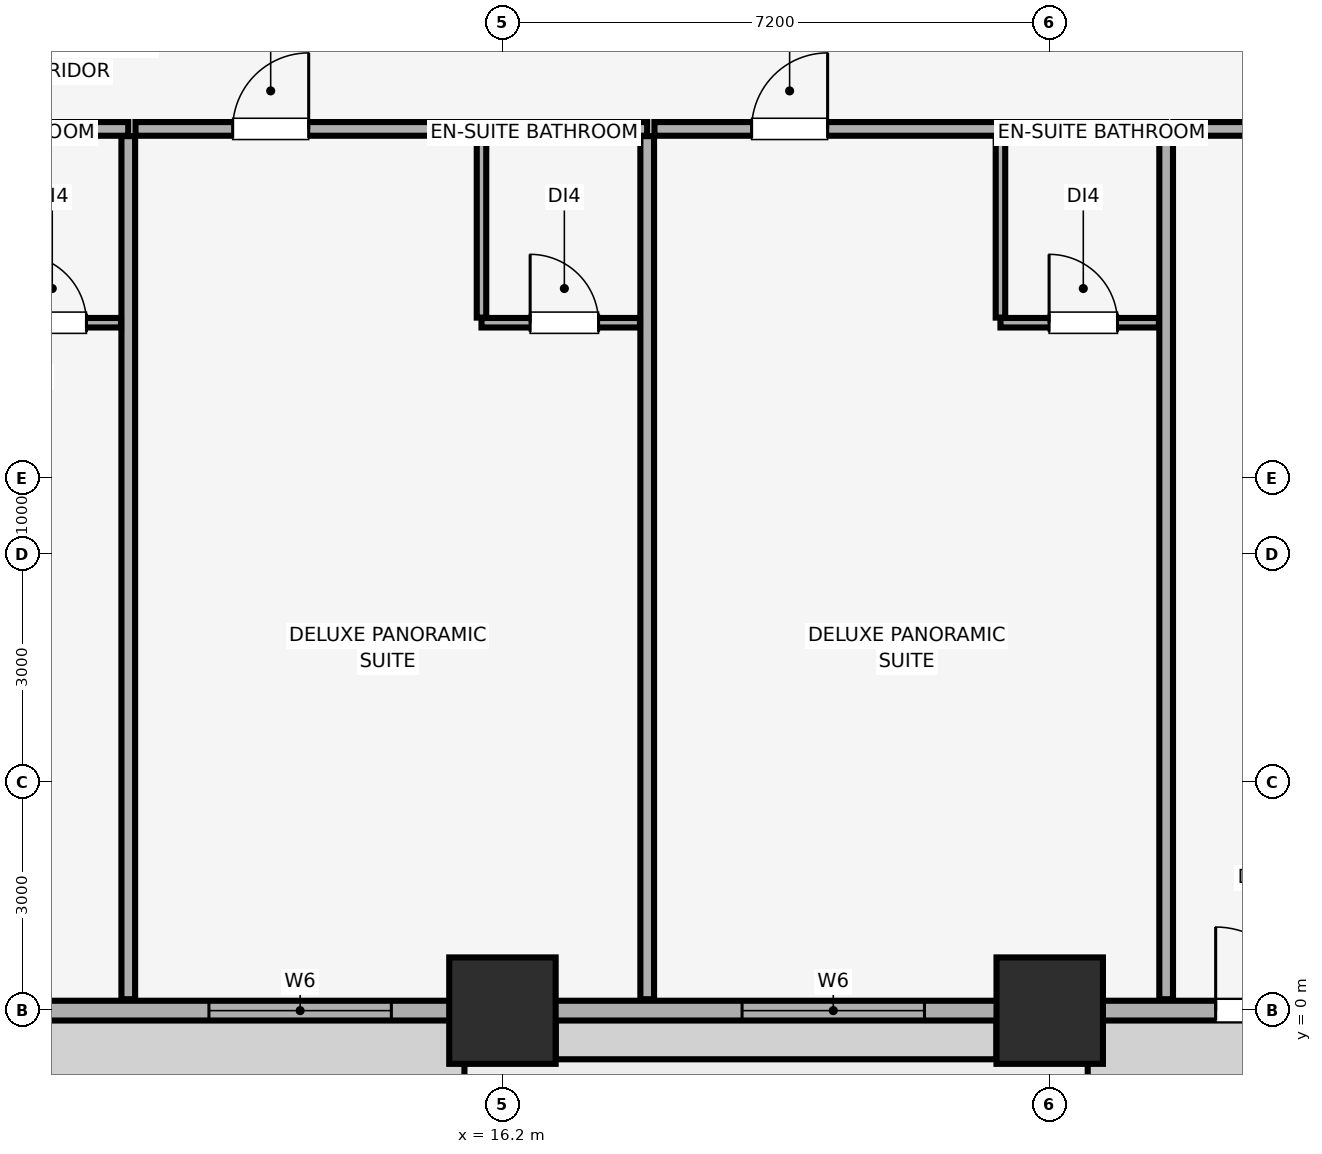
"""IFC4 building model, lengths in metres.
Left out: names, types, materials, properties, quantities, classifications, styles, units other than length and angle.
Written with IfcOpenShell. Run it as: python <this file> out.ifc"""

import sys

from ifc_helpers import new_model, si_unit, direction, frame, frame_2d, origin, origin_2d, place, context, subcontext, project, spatial, rectangle, extrude, element, fill, save


model = new_model("IFC4")
c1 = context("Model", 3, precision=1e-05, world=origin(), true_north=direction((0.0, 1.0)))
c2 = subcontext(c1, "Body", "Model", "MODEL_VIEW")
j1 = project(units=[si_unit("LENGTHUNIT", "METRE"), si_unit("PLANEANGLEUNIT", "RADIAN")], contexts=[c1])
p1 = place(None, origin())
s1 = spatial("IfcSite", under=j1, at=p1, CompositionType="ELEMENT")
p2 = place(p1, origin())
s2 = spatial("IfcBuilding", under=s1, at=p2, CompositionType="ELEMENT")
p3 = place(p2, frame((0.0, 0.0, 57.65)))
s3 = spatial("IfcBuildingStorey", under=s2, at=p3, CompositionType="ELEMENT", Elevation=57.65)
for number, where, z_axis, x_axis in (
    (1, (16.2, 0.0, 0.0), (0.0, 0.0, 1.0), (1.0, 0.0, 0.0)),
    (2, (23.4, 0.0, 0.0), (0.0, 0.0, 1.0), (1.0, 0.0, 0.0)),
):
    element("IfcColumn", number, at=place(p3, frame(where, z_axis=z_axis, x_axis=x_axis)), inside=s3, PredefinedType="COLUMN", context=c2, shape_type="SweptSolid", body=[
        extrude(rectangle(XDim=1.4, YDim=1.4, at=origin_2d()), origin(), (0.0, 0.0, 1.0), 3.51),
    ])
p4 = place(p3, frame((4.2, 0.0, 0.0), z_axis=(0.0, 0.0, 1.0), x_axis=(1.0, 0.0, 0.0)))
e3 = element("IfcWall", 3, at=p4, inside=s3, PredefinedType="SOLIDWALL", context=c2, shape_type="SweptSolid", body=[
    extrude(rectangle(XDim=75.6, YDim=0.26, at=frame_2d((37.8, 0.0))), origin(), (0.0, 0.0, 1.0), 2.56),
])
p5 = place(p4, frame((21.383, 0.0, 0.0)))
e4 = element("IfcOpeningElement", 4, at=p5, cuts=e3, PredefinedType="OPENING", context=c2, shape_type="SweptSolid", body=[
    extrude(rectangle(XDim=1.1, YDim=2.15, at=frame_2d((0.55, 1.075))), frame((0.0, 0.14, 0.0), z_axis=(0.0, -1.0, 0.0), x_axis=(1.0, 0.0, 0.0)), (0.0, 0.0, 1.0), 0.28),
])
p6 = place(p4, frame((37.25, 0.0, 0.0)))
e5 = element("IfcOpeningElement", 5, at=p6, cuts=e3, PredefinedType="OPENING", context=c2, shape_type="SweptSolid", body=[
    extrude(rectangle(XDim=1.1, YDim=2.15, at=frame_2d((0.55, 1.075))), frame((0.0, 0.14, 0.0), z_axis=(0.0, -1.0, 0.0), x_axis=(1.0, 0.0, 0.0)), (0.0, 0.0, 1.0), 0.28),
])
p7 = place(p4, frame((53.117, 0.0, 0.0)))
e6 = element("IfcOpeningElement", 6, at=p7, cuts=e3, PredefinedType="OPENING", context=c2, shape_type="SweptSolid", body=[
    extrude(rectangle(XDim=1.1, YDim=2.15, at=frame_2d((0.55, 1.075))), frame((0.0, 0.14, 0.0), z_axis=(0.0, -1.0, 0.0), x_axis=(1.0, 0.0, 0.0)), (0.0, 0.0, 1.0), 0.28),
])
p8 = place(p4, frame((1.035, 0.0, 0.85)))
e7 = element("IfcOpeningElement", 7, at=p8, cuts=e3, PredefinedType="OPENING", context=c2, shape_type="SweptSolid", body=[
    extrude(rectangle(XDim=2.4, YDim=1.5, at=frame_2d((1.2, 0.75))), frame((0.0, 0.14, 0.0), z_axis=(0.0, -1.0, 0.0), x_axis=(1.0, 0.0, 0.0)), (0.0, 0.0, 1.0), 0.28),
])
p9 = place(p4, frame((8.138, 0.0, 0.85)))
e8 = element("IfcOpeningElement", 8, at=p9, cuts=e3, PredefinedType="OPENING", context=c2, shape_type="SweptSolid", body=[
    extrude(rectangle(XDim=2.4, YDim=1.5, at=frame_2d((1.2, 0.75))), frame((0.0, 0.14, 0.0), z_axis=(0.0, -1.0, 0.0), x_axis=(1.0, 0.0, 0.0)), (0.0, 0.0, 1.0), 0.28),
])
p10 = place(p4, frame((15.153, 0.0, 0.85)))
e9 = element("IfcOpeningElement", 9, at=p10, cuts=e3, PredefinedType="OPENING", context=c2, shape_type="SweptSolid", body=[
    extrude(rectangle(XDim=2.4, YDim=1.5, at=frame_2d((1.2, 0.75))), frame((0.0, 0.14, 0.0), z_axis=(0.0, -1.0, 0.0), x_axis=(1.0, 0.0, 0.0)), (0.0, 0.0, 1.0), 0.28),
])
p11 = place(p4, frame((23.127, 0.0, 0.85)))
e10 = element("IfcOpeningElement", 10, at=p11, cuts=e3, PredefinedType="OPENING", context=c2, shape_type="SweptSolid", body=[
    extrude(rectangle(XDim=2.4, YDim=1.5, at=frame_2d((1.2, 0.75))), frame((0.0, 0.14, 0.0), z_axis=(0.0, -1.0, 0.0), x_axis=(1.0, 0.0, 0.0)), (0.0, 0.0, 1.0), 0.28),
])
p12 = place(p4, frame((29.179, 0.0, 0.85)))
e11 = element("IfcOpeningElement", 11, at=p12, cuts=e3, PredefinedType="OPENING", context=c2, shape_type="SweptSolid", body=[
    extrude(rectangle(XDim=2.4, YDim=1.5, at=frame_2d((1.2, 0.75))), frame((0.0, 0.14, 0.0), z_axis=(0.0, -1.0, 0.0), x_axis=(1.0, 0.0, 0.0)), (0.0, 0.0, 1.0), 0.28),
])
p13 = place(p4, frame((34.983, 0.0, 0.85)))
e12 = element("IfcOpeningElement", 12, at=p13, cuts=e3, PredefinedType="OPENING", context=c2, shape_type="SweptSolid", body=[
    extrude(rectangle(XDim=1.5, YDim=1.4, at=frame_2d((0.75, 0.7))), frame((0.0, 0.14, 0.0), z_axis=(0.0, -1.0, 0.0), x_axis=(1.0, 0.0, 0.0)), (0.0, 0.0, 1.0), 0.28),
])
p14 = place(p4, frame((39.117, 0.0, 0.85)))
e13 = element("IfcOpeningElement", 13, at=p14, cuts=e3, PredefinedType="OPENING", context=c2, shape_type="SweptSolid", body=[
    extrude(rectangle(XDim=1.5, YDim=1.4, at=frame_2d((0.75, 0.7))), frame((0.0, 0.14, 0.0), z_axis=(0.0, -1.0, 0.0), x_axis=(1.0, 0.0, 0.0)), (0.0, 0.0, 1.0), 0.28),
])
p15 = place(p4, frame((44.021, 0.0, 0.85)))
e14 = element("IfcOpeningElement", 14, at=p15, cuts=e3, PredefinedType="OPENING", context=c2, shape_type="SweptSolid", body=[
    extrude(rectangle(XDim=2.4, YDim=1.5, at=frame_2d((1.2, 0.75))), frame((0.0, 0.14, 0.0), z_axis=(0.0, -1.0, 0.0), x_axis=(1.0, 0.0, 0.0)), (0.0, 0.0, 1.0), 0.28),
])
p16 = place(p4, frame((50.073, 0.0, 0.85)))
e15 = element("IfcOpeningElement", 15, at=p16, cuts=e3, PredefinedType="OPENING", context=c2, shape_type="SweptSolid", body=[
    extrude(rectangle(XDim=2.4, YDim=1.5, at=frame_2d((1.2, 0.75))), frame((0.0, 0.14, 0.0), z_axis=(0.0, -1.0, 0.0), x_axis=(1.0, 0.0, 0.0)), (0.0, 0.0, 1.0), 0.28),
])
p17 = place(p4, frame((58.048, 0.0, 0.85)))
e16 = element("IfcOpeningElement", 16, at=p17, cuts=e3, PredefinedType="OPENING", context=c2, shape_type="SweptSolid", body=[
    extrude(rectangle(XDim=2.4, YDim=1.5, at=frame_2d((1.2, 0.75))), frame((0.0, 0.14, 0.0), z_axis=(0.0, -1.0, 0.0), x_axis=(1.0, 0.0, 0.0)), (0.0, 0.0, 1.0), 0.28),
])
p18 = place(p4, frame((65.062, 0.0, 0.85)))
e17 = element("IfcOpeningElement", 17, at=p18, cuts=e3, PredefinedType="OPENING", context=c2, shape_type="SweptSolid", body=[
    extrude(rectangle(XDim=2.4, YDim=1.5, at=frame_2d((1.2, 0.75))), frame((0.0, 0.14, 0.0), z_axis=(0.0, -1.0, 0.0), x_axis=(1.0, 0.0, 0.0)), (0.0, 0.0, 1.0), 0.28),
])
p19 = place(p4, frame((72.165, 0.0, 0.85)))
e18 = element("IfcOpeningElement", 18, at=p19, cuts=e3, PredefinedType="OPENING", context=c2, shape_type="SweptSolid", body=[
    extrude(rectangle(XDim=2.4, YDim=1.5, at=frame_2d((1.2, 0.75))), frame((0.0, 0.14, 0.0), z_axis=(0.0, -1.0, 0.0), x_axis=(1.0, 0.0, 0.0)), (0.0, 0.0, 1.0), 0.28),
])
p20 = place(p3, frame((0.15, 11.6, 0.0), z_axis=(0.0, 0.0, 1.0), x_axis=(1.0, 0.0, 0.0)))
e19 = element("IfcWall", 19, at=p20, inside=s3, PredefinedType="PARTITIONING", context=c2, shape_type="SweptSolid", body=[
    extrude(rectangle(XDim=11.127, YDim=0.18, at=frame_2d((5.564, 0.0))), origin(), (0.0, 0.0, 1.0), 3.51),
])
p21 = place(p20, frame((5.514, 0.0, 0.0)))
e20 = element("IfcOpeningElement", 20, at=p21, cuts=e19, PredefinedType="OPENING", context=c2, shape_type="SweptSolid", body=[
    extrude(rectangle(XDim=1.0, YDim=2.15, at=frame_2d((0.5, 1.075))), frame((0.0, 0.1, 0.0), z_axis=(0.0, -1.0, 0.0), x_axis=(1.0, 0.0, 0.0)), (0.0, 0.0, 1.0), 0.2),
])
p22 = place(p3, frame((11.277, 0.15, 0.0), z_axis=(0.0, 0.0, 1.0), x_axis=(0.0, 1.0, 0.0)))
e21 = element("IfcWall", 21, at=p22, inside=s3, PredefinedType="PARTITIONING", context=c2, shape_type="SweptSolid", body=[
    extrude(rectangle(XDim=11.355, YDim=0.18, at=frame_2d((5.677, 0.0))), origin(), (0.0, 0.0, 1.0), 3.51),
])
p23 = place(p3, frame((8.777, 9.05, 0.0), z_axis=(0.0, 0.0, 1.0), x_axis=(1.0, 0.0, 0.0)))
e22 = element("IfcWall", 22, at=p23, inside=s3, PredefinedType="PARTITIONING", context=c2, shape_type="SweptSolid", body=[
    extrude(rectangle(XDim=2.405, YDim=0.125, at=frame_2d((1.203, 0.0))), origin(), (0.0, 0.0, 1.0), 3.51),
])
p24 = place(p23, frame((1.05, 0.0, 0.0)))
e23 = element("IfcOpeningElement", 23, at=p24, cuts=e22, PredefinedType="OPENING", context=c2, shape_type="SweptSolid", body=[
    extrude(rectangle(XDim=0.9, YDim=2.1, at=frame_2d((0.45, 1.05))), frame((0.0, 0.073, 0.0), z_axis=(0.0, -1.0, 0.0), x_axis=(1.0, 0.0, 0.0)), (0.0, 0.0, 1.0), 0.145),
])
p25 = place(p3, frame((11.372, 11.6, 0.0), z_axis=(0.0, 0.0, 1.0), x_axis=(1.0, 0.0, 0.0)))
e24 = element("IfcWall", 24, at=p25, inside=s3, PredefinedType="PARTITIONING", context=c2, shape_type="SweptSolid", body=[
    extrude(rectangle(XDim=6.732, YDim=0.18, at=frame_2d((3.366, 0.0))), origin(), (0.0, 0.0, 1.0), 3.51),
])
p26 = place(p25, frame((1.279, 0.0, 0.0)))
e25 = element("IfcOpeningElement", 25, at=p26, cuts=e24, PredefinedType="OPENING", context=c2, shape_type="SweptSolid", body=[
    extrude(rectangle(XDim=1.0, YDim=2.15, at=frame_2d((0.5, 1.075))), frame((0.0, 0.1, 0.0), z_axis=(0.0, -1.0, 0.0), x_axis=(1.0, 0.0, 0.0)), (0.0, 0.0, 1.0), 0.2),
])
p27 = place(p3, frame((18.104, 0.15, 0.0), z_axis=(0.0, 0.0, 1.0), x_axis=(0.0, 1.0, 0.0)))
e26 = element("IfcWall", 26, at=p27, inside=s3, PredefinedType="PARTITIONING", context=c2, shape_type="SweptSolid", body=[
    extrude(rectangle(XDim=11.355, YDim=0.18, at=frame_2d((5.677, 0.0))), origin(), (0.0, 0.0, 1.0), 3.51),
])
p28 = place(p3, frame((15.925, 9.05, 0.0), z_axis=(0.0, 0.0, 1.0), x_axis=(1.0, 0.0, 0.0)))
e27 = element("IfcWall", 27, at=p28, inside=s3, PredefinedType="PARTITIONING", context=c2, shape_type="SweptSolid", body=[
    extrude(rectangle(XDim=2.085, YDim=0.125, at=frame_2d((1.042, 0.0))), origin(), (0.0, 0.0, 1.0), 3.51),
])
p29 = place(p28, frame((0.64, 0.0, 0.0)))
e28 = element("IfcOpeningElement", 28, at=p29, cuts=e27, PredefinedType="OPENING", context=c2, shape_type="SweptSolid", body=[
    extrude(rectangle(XDim=0.9, YDim=2.1, at=frame_2d((0.45, 1.05))), frame((0.0, 0.073, 0.0), z_axis=(0.0, -1.0, 0.0), x_axis=(1.0, 0.0, 0.0)), (0.0, 0.0, 1.0), 0.145),
])
p30 = place(p3, frame((15.925, 9.117, 0.0), z_axis=(0.0, 0.0, 1.0), x_axis=(0.0, 1.0, 0.0)))
e29 = element("IfcWall", 29, at=p30, inside=s3, PredefinedType="PARTITIONING", context=c2, shape_type="SweptSolid", body=[
    extrude(rectangle(XDim=2.387, YDim=0.125, at=frame_2d((1.194, 0.0))), origin(), (0.0, 0.0, 1.0), 3.51),
])
p31 = place(p3, frame((18.199, 11.6, 0.0), z_axis=(0.0, 0.0, 1.0), x_axis=(1.0, 0.0, 0.0)))
e30 = element("IfcWall", 30, at=p31, inside=s3, PredefinedType="PARTITIONING", context=c2, shape_type="SweptSolid", body=[
    extrude(rectangle(XDim=6.732, YDim=0.18, at=frame_2d((3.366, 0.0))), origin(), (0.0, 0.0, 1.0), 3.51),
])
p32 = place(p31, frame((1.279, 0.0, 0.0)))
e31 = element("IfcOpeningElement", 31, at=p32, cuts=e30, PredefinedType="OPENING", context=c2, shape_type="SweptSolid", body=[
    extrude(rectangle(XDim=1.0, YDim=2.15, at=frame_2d((0.5, 1.075))), frame((0.0, 0.1, 0.0), z_axis=(0.0, -1.0, 0.0), x_axis=(1.0, 0.0, 0.0)), (0.0, 0.0, 1.0), 0.2),
])
p33 = place(p3, frame((24.932, 0.15, 0.0), z_axis=(0.0, 0.0, 1.0), x_axis=(0.0, 1.0, 0.0)))
e32 = element("IfcWall", 32, at=p33, inside=s3, PredefinedType="PARTITIONING", context=c2, shape_type="SweptSolid", body=[
    extrude(rectangle(XDim=11.355, YDim=0.18, at=frame_2d((5.677, 0.0))), origin(), (0.0, 0.0, 1.0), 3.51),
])
p34 = place(p3, frame((22.752, 9.05, 0.0), z_axis=(0.0, 0.0, 1.0), x_axis=(1.0, 0.0, 0.0)))
e33 = element("IfcWall", 33, at=p34, inside=s3, PredefinedType="PARTITIONING", context=c2, shape_type="SweptSolid", body=[
    extrude(rectangle(XDim=2.085, YDim=0.125, at=frame_2d((1.042, 0.0))), origin(), (0.0, 0.0, 1.0), 3.51),
])
p35 = place(p34, frame((0.64, 0.0, 0.0)))
e34 = element("IfcOpeningElement", 34, at=p35, cuts=e33, PredefinedType="OPENING", context=c2, shape_type="SweptSolid", body=[
    extrude(rectangle(XDim=0.9, YDim=2.1, at=frame_2d((0.45, 1.05))), frame((0.0, 0.073, 0.0), z_axis=(0.0, -1.0, 0.0), x_axis=(1.0, 0.0, 0.0)), (0.0, 0.0, 1.0), 0.145),
])
p36 = place(p3, frame((22.752, 9.117, 0.0), z_axis=(0.0, 0.0, 1.0), x_axis=(0.0, 1.0, 0.0)))
e35 = element("IfcWall", 35, at=p36, inside=s3, PredefinedType="PARTITIONING", context=c2, shape_type="SweptSolid", body=[
    extrude(rectangle(XDim=2.387, YDim=0.125, at=frame_2d((1.194, 0.0))), origin(), (0.0, 0.0, 1.0), 3.51),
])
p37 = place(p3, frame((25.027, 11.6, 0.0), z_axis=(0.0, 0.0, 1.0), x_axis=(1.0, 0.0, 0.0)))
e36 = element("IfcWall", 36, at=p37, inside=s3, PredefinedType="PARTITIONING", context=c2, shape_type="SweptSolid", body=[
    extrude(rectangle(XDim=6.732, YDim=0.18, at=frame_2d((3.366, 0.0))), origin(), (0.0, 0.0, 1.0), 3.51),
])
p38 = place(p37, frame((1.279, 0.0, 0.0)))
e37 = element("IfcOpeningElement", 37, at=p38, cuts=e36, PredefinedType="OPENING", context=c2, shape_type="SweptSolid", body=[
    extrude(rectangle(XDim=1.0, YDim=2.15, at=frame_2d((0.5, 1.075))), frame((0.0, 0.1, 0.0), z_axis=(0.0, -1.0, 0.0), x_axis=(1.0, 0.0, 0.0)), (0.0, 0.0, 1.0), 0.2),
])
p39 = place(p5, origin())
e38 = element("IfcDoor", 38, at=p39, inside=s3, OperationType="SINGLE_SWING_LEFT", PredefinedType="DOOR", context=c2, shape_type="SweptSolid", body=[
    extrude(rectangle(XDim=1.1, YDim=2.15, at=frame_2d((0.55, 1.075))), frame((0.0, 0.025, 0.0), z_axis=(0.0, -1.0, 0.0), x_axis=(1.0, 0.0, 0.0)), (0.0, 0.0, 1.0), 0.05),
])
fill(e4, e38)
p40 = place(p9, origin())
e39 = element("IfcWindow", 39, at=p40, inside=s3, PartitioningType="SINGLE_PANEL", PredefinedType="WINDOW", context=c2, shape_type="SweptSolid", body=[
    extrude(rectangle(XDim=2.4, YDim=1.5, at=frame_2d((1.2, 0.75))), frame((0.0, 0.03, 0.0), z_axis=(0.0, -1.0, 0.0), x_axis=(1.0, 0.0, 0.0)), (0.0, 0.0, 1.0), 0.06),
])
fill(e8, e39)
p41 = place(p10, origin())
e40 = element("IfcWindow", 40, at=p41, inside=s3, PartitioningType="SINGLE_PANEL", PredefinedType="WINDOW", context=c2, shape_type="SweptSolid", body=[
    extrude(rectangle(XDim=2.4, YDim=1.5, at=frame_2d((1.2, 0.75))), frame((0.0, 0.03, 0.0), z_axis=(0.0, -1.0, 0.0), x_axis=(1.0, 0.0, 0.0)), (0.0, 0.0, 1.0), 0.06),
])
fill(e9, e40)
p42 = place(p24, origin())
e41 = element("IfcDoor", 41, at=p42, inside=s3, OperationType="SINGLE_SWING_LEFT", PredefinedType="DOOR", context=c2, shape_type="SweptSolid", body=[
    extrude(rectangle(XDim=0.9, YDim=2.1, at=frame_2d((0.45, 1.05))), frame((0.0, 0.025, 0.0), z_axis=(0.0, -1.0, 0.0), x_axis=(1.0, 0.0, 0.0)), (0.0, 0.0, 1.0), 0.05),
])
fill(e23, e41)
p43 = place(p26, origin())
e42 = element("IfcDoor", 42, at=p43, inside=s3, OperationType="SINGLE_SWING_RIGHT", PredefinedType="DOOR", context=c2, shape_type="SweptSolid", body=[
    extrude(rectangle(XDim=1.0, YDim=2.15, at=frame_2d((0.5, 1.075))), frame((0.0, 0.025, 0.0), z_axis=(0.0, -1.0, 0.0), x_axis=(1.0, 0.0, 0.0)), (0.0, 0.0, 1.0), 0.05),
])
fill(e25, e42)
p44 = place(p29, origin())
e43 = element("IfcDoor", 43, at=p44, inside=s3, OperationType="SINGLE_SWING_LEFT", PredefinedType="DOOR", context=c2, shape_type="SweptSolid", body=[
    extrude(rectangle(XDim=0.9, YDim=2.1, at=frame_2d((0.45, 1.05))), frame((0.0, 0.025, 0.0), z_axis=(0.0, -1.0, 0.0), x_axis=(1.0, 0.0, 0.0)), (0.0, 0.0, 1.0), 0.05),
])
fill(e28, e43)
p45 = place(p32, origin())
e44 = element("IfcDoor", 44, at=p45, inside=s3, OperationType="SINGLE_SWING_RIGHT", PredefinedType="DOOR", context=c2, shape_type="SweptSolid", body=[
    extrude(rectangle(XDim=1.0, YDim=2.15, at=frame_2d((0.5, 1.075))), frame((0.0, 0.025, 0.0), z_axis=(0.0, -1.0, 0.0), x_axis=(1.0, 0.0, 0.0)), (0.0, 0.0, 1.0), 0.05),
])
fill(e31, e44)
p46 = place(p35, origin())
e45 = element("IfcDoor", 45, at=p46, inside=s3, OperationType="SINGLE_SWING_LEFT", PredefinedType="DOOR", context=c2, shape_type="SweptSolid", body=[
    extrude(rectangle(XDim=0.9, YDim=2.1, at=frame_2d((0.45, 1.05))), frame((0.0, 0.025, 0.0), z_axis=(0.0, -1.0, 0.0), x_axis=(1.0, 0.0, 0.0)), (0.0, 0.0, 1.0), 0.05),
])
fill(e34, e45)
save(model, sys.argv[1])
